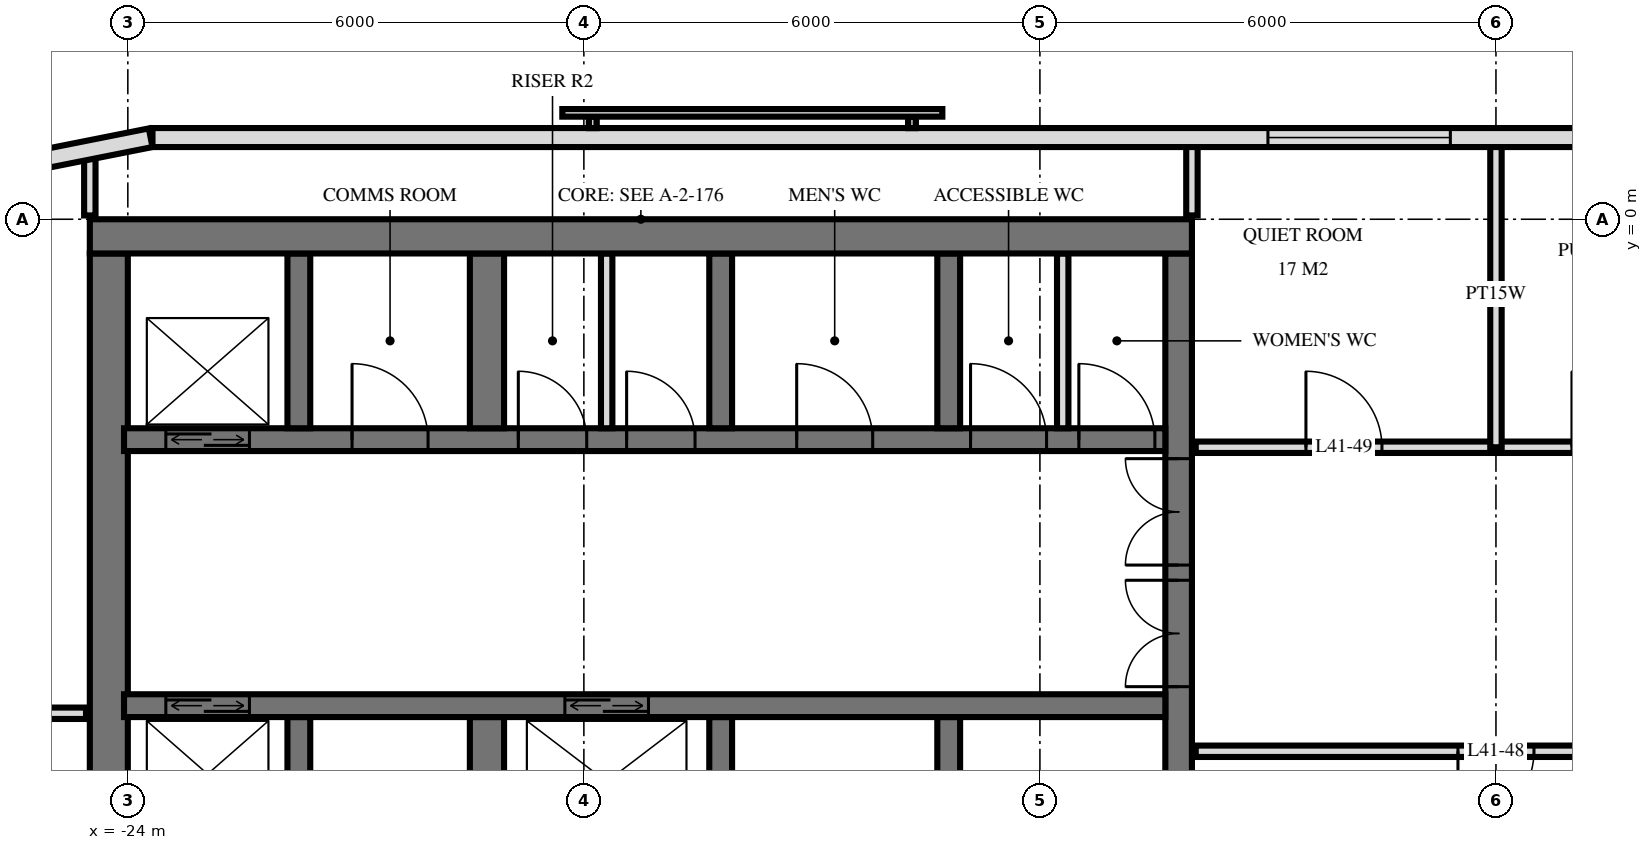
"""IFC4 building model, lengths in metres.
Left out: names, types, materials, properties, quantities, classifications, styles, units other than length and angle.
Written with IfcOpenShell. Run it as: python <this file> out.ifc"""

import sys

from ifc_helpers import new_model, si_unit, direction, frame, frame_2d, origin, place, context, subcontext, project, spatial, rectangle, extrude, element, fill, save


model = new_model("IFC4")
c1 = context("Model", 3, precision=1e-05, world=origin(), true_north=direction((0.0, 1.0)))
c2 = subcontext(c1, "Body", "Model", "MODEL_VIEW")
j1 = project(units=[si_unit("LENGTHUNIT", "METRE"), si_unit("PLANEANGLEUNIT", "RADIAN")], contexts=[c1])
p1 = place(None, origin())
s1 = spatial("IfcSite", under=j1, at=p1, CompositionType="ELEMENT")
p2 = place(p1, origin())
s2 = spatial("IfcBuilding", under=s1, at=p2, CompositionType="ELEMENT")
p3 = place(p2, frame((0.0, 0.0, 159.6)))
s3 = spatial("IfcBuildingStorey", under=s2, at=p3, CompositionType="ELEMENT", Elevation=159.6)
p4 = place(p3, frame((-24.5, -0.225, 0.0), z_axis=(0.0, 0.0, 1.0), x_axis=(1.0, 0.0, 0.0)))
e1 = element("IfcWall", 1, at=p4, inside=s3, PredefinedType="SHEAR", context=c2, shape_type="SweptSolid", body=[
    extrude(rectangle(XDim=14.5, YDim=0.45, at=frame_2d((7.25, 0.0))), origin(), (0.0, 0.0, 1.0), 3.6),
])
p5 = place(p3, frame((-10.175, -14.55, 0.0), z_axis=(0.0, 0.0, 1.0), x_axis=(0.0, 1.0, 0.0)))
e2 = element("IfcWall", 2, at=p5, inside=s3, PredefinedType="SHEAR", context=c2, shape_type="SweptSolid", body=[
    extrude(rectangle(XDim=14.1, YDim=0.35, at=frame_2d((7.05, 0.0))), origin(), (0.0, 0.0, 1.0), 3.6),
])
p6 = place(p5, frame((8.4, 0.0, 0.0)))
e3 = element("IfcOpeningElement", 3, at=p6, cuts=e2, PredefinedType="OPENING", context=c2, shape_type="SweptSolid", body=[
    extrude(rectangle(XDim=1.4, YDim=2.4, at=frame_2d((0.7, 1.2))), frame((0.0, 0.185, 0.0), z_axis=(0.0, -1.0, 0.0), x_axis=(1.0, 0.0, 0.0)), (0.0, 0.0, 1.0), 0.37),
])
p7 = place(p5, frame((10.0, 0.0, 0.0)))
e4 = element("IfcOpeningElement", 4, at=p7, cuts=e2, PredefinedType="OPENING", context=c2, shape_type="SweptSolid", body=[
    extrude(rectangle(XDim=1.4, YDim=2.4, at=frame_2d((0.7, 1.2))), frame((0.0, 0.185, 0.0), z_axis=(0.0, -1.0, 0.0), x_axis=(1.0, 0.0, 0.0)), (0.0, 0.0, 1.0), 0.37),
])
p8 = place(p5, frame((4.0, 0.0, 0.0)))
e5 = element("IfcOpeningElement", 5, at=p8, cuts=e2, PredefinedType="OPENING", context=c2, shape_type="SweptSolid", body=[
    extrude(rectangle(XDim=1.2, YDim=2.1, at=frame_2d((0.6, 1.05))), frame((0.0, 0.185, 0.0), z_axis=(0.0, -1.0, 0.0), x_axis=(1.0, 0.0, 0.0)), (0.0, 0.0, 1.0), 0.37),
])
p9 = place(p3, frame((-24.25, -14.55, 0.0), z_axis=(0.0, 0.0, 1.0), x_axis=(0.0, 1.0, 0.0)))
e6 = element("IfcWall", 6, at=p9, inside=s3, PredefinedType="SHEAR", context=c2, shape_type="SweptSolid", body=[
    extrude(rectangle(XDim=14.1, YDim=0.5, at=frame_2d((7.05, 0.0))), origin(), (0.0, 0.0, 1.0), 3.6),
])
p10 = place(p3, frame((-24.05, -2.9, 0.0), z_axis=(0.0, 0.0, 1.0), x_axis=(1.0, 0.0, 0.0)))
e7 = element("IfcWall", 7, at=p10, inside=s3, PredefinedType="SHEAR", context=c2, shape_type="SweptSolid", body=[
    extrude(rectangle(XDim=13.7, YDim=0.3, at=frame_2d((6.85, 0.0))), origin(), (0.0, 0.0, 1.0), 3.6),
])
p11 = place(p10, frame((0.55, 0.0, 0.0)))
e8 = element("IfcOpeningElement", 8, at=p11, cuts=e7, PredefinedType="OPENING", context=c2, shape_type="SweptSolid", body=[
    extrude(rectangle(XDim=1.1, YDim=2.1, at=frame_2d((0.55, 1.05))), frame((0.0, 0.16, 0.0), z_axis=(0.0, -1.0, 0.0), x_axis=(1.0, 0.0, 0.0)), (0.0, 0.0, 1.0), 0.32),
])
p12 = place(p10, frame((6.613, 0.0, 0.0)))
e9 = element("IfcOpeningElement", 9, at=p12, cuts=e7, PredefinedType="OPENING", context=c2, shape_type="SweptSolid", body=[
    extrude(rectangle(XDim=0.9, YDim=2.1, at=frame_2d((0.45, 1.05))), frame((0.0, 0.16, 0.0), z_axis=(0.0, -1.0, 0.0), x_axis=(1.0, 0.0, 0.0)), (0.0, 0.0, 1.0), 0.32),
])
p13 = place(p10, frame((5.188, 0.0, 0.0)))
e10 = element("IfcOpeningElement", 10, at=p13, cuts=e7, PredefinedType="OPENING", context=c2, shape_type="SweptSolid", body=[
    extrude(rectangle(XDim=0.9, YDim=2.1, at=frame_2d((0.45, 1.05))), frame((0.0, 0.16, 0.0), z_axis=(0.0, -1.0, 0.0), x_axis=(1.0, 0.0, 0.0)), (0.0, 0.0, 1.0), 0.32),
])
p14 = place(p10, frame((12.562, 0.0, 0.0)))
e11 = element("IfcOpeningElement", 11, at=p14, cuts=e7, PredefinedType="OPENING", context=c2, shape_type="SweptSolid", body=[
    extrude(rectangle(XDim=1.0, YDim=2.1, at=frame_2d((0.5, 1.05))), frame((0.0, 0.16, 0.0), z_axis=(0.0, -1.0, 0.0), x_axis=(1.0, 0.0, 0.0)), (0.0, 0.0, 1.0), 0.32),
])
p15 = place(p10, frame((11.137, 0.0, 0.0)))
e12 = element("IfcOpeningElement", 12, at=p15, cuts=e7, PredefinedType="OPENING", context=c2, shape_type="SweptSolid", body=[
    extrude(rectangle(XDim=1.0, YDim=2.1, at=frame_2d((0.5, 1.05))), frame((0.0, 0.16, 0.0), z_axis=(0.0, -1.0, 0.0), x_axis=(1.0, 0.0, 0.0)), (0.0, 0.0, 1.0), 0.32),
])
p16 = place(p10, frame((8.85, 0.0, 0.0)))
e13 = element("IfcOpeningElement", 13, at=p16, cuts=e7, PredefinedType="OPENING", context=c2, shape_type="SweptSolid", body=[
    extrude(rectangle(XDim=1.0, YDim=2.1, at=frame_2d((0.5, 1.05))), frame((0.0, 0.16, 0.0), z_axis=(0.0, -1.0, 0.0), x_axis=(1.0, 0.0, 0.0)), (0.0, 0.0, 1.0), 0.32),
])
p17 = place(p10, frame((3.0, 0.0, 0.0)))
e14 = element("IfcOpeningElement", 14, at=p17, cuts=e7, PredefinedType="OPENING", context=c2, shape_type="SweptSolid", body=[
    extrude(rectangle(XDim=1.0, YDim=2.1, at=frame_2d((0.5, 1.05))), frame((0.0, 0.16, 0.0), z_axis=(0.0, -1.0, 0.0), x_axis=(1.0, 0.0, 0.0)), (0.0, 0.0, 1.0), 0.32),
])
p18 = place(p3, frame((-24.05, -6.4, 0.0), z_axis=(0.0, 0.0, 1.0), x_axis=(1.0, 0.0, 0.0)))
e15 = element("IfcWall", 15, at=p18, inside=s3, PredefinedType="SHEAR", context=c2, shape_type="SweptSolid", body=[
    extrude(rectangle(XDim=13.7, YDim=0.3, at=frame_2d((6.85, 0.0))), origin(), (0.0, 0.0, 1.0), 3.6),
])
p19 = place(p18, frame((0.55, 0.0, 0.0)))
e16 = element("IfcOpeningElement", 16, at=p19, cuts=e15, PredefinedType="OPENING", context=c2, shape_type="SweptSolid", body=[
    extrude(rectangle(XDim=1.1, YDim=2.1, at=frame_2d((0.55, 1.05))), frame((0.0, 0.16, 0.0), z_axis=(0.0, -1.0, 0.0), x_axis=(1.0, 0.0, 0.0)), (0.0, 0.0, 1.0), 0.32),
])
p20 = place(p18, frame((5.8, 0.0, 0.0)))
e17 = element("IfcOpeningElement", 17, at=p20, cuts=e15, PredefinedType="OPENING", context=c2, shape_type="SweptSolid", body=[
    extrude(rectangle(XDim=1.1, YDim=2.1, at=frame_2d((0.55, 1.05))), frame((0.0, 0.16, 0.0), z_axis=(0.0, -1.0, 0.0), x_axis=(1.0, 0.0, 0.0)), (0.0, 0.0, 1.0), 0.32),
])
for number, where, z_axis, x_axis in (
    (18, (-13.2, -2.75, 0.0), (0.0, 0.0, 1.0), (0.0, 1.0, 0.0)),
    (19, (-13.2, -8.85, 0.0), (0.0, 0.0, 1.0), (0.0, 1.0, 0.0)),
    (20, (-16.2, -2.75, 0.0), (0.0, 0.0, 1.0), (0.0, 1.0, 0.0)),
    (21, (-16.2, -8.85, 0.0), (0.0, 0.0, 1.0), (0.0, 1.0, 0.0)),
):
    element("IfcWall", number, at=place(p3, frame(where, z_axis=z_axis, x_axis=x_axis)), inside=s3, PredefinedType="SHEAR", context=c2, shape_type="SweptSolid", body=[
        extrude(rectangle(XDim=2.3, YDim=0.3, at=frame_2d((1.15, 0.0))), origin(), (0.0, 0.0, 1.0), 3.6),
    ])
for number, where, z_axis, x_axis in (
    (22, (-19.275, -2.75, 0.0), (0.0, 0.0, 1.0), (0.0, 1.0, 0.0)),
    (23, (-19.275, -8.85, 0.0), (0.0, 0.0, 1.0), (0.0, 1.0, 0.0)),
):
    element("IfcWall", number, at=place(p3, frame(where, z_axis=z_axis, x_axis=x_axis)), inside=s3, PredefinedType="SHEAR", context=c2, shape_type="SweptSolid", body=[
        extrude(rectangle(XDim=2.3, YDim=0.45, at=frame_2d((1.15, 0.0))), origin(), (0.0, 0.0, 1.0), 3.6),
    ])
for number, where, z_axis, x_axis in (
    (24, (-21.75, -2.75, 0.0), (0.0, 0.0, 1.0), (0.0, 1.0, 0.0)),
    (25, (-21.75, -8.85, 0.0), (0.0, 0.0, 1.0), (0.0, 1.0, 0.0)),
):
    element("IfcWall", number, at=place(p3, frame(where, z_axis=z_axis, x_axis=x_axis)), inside=s3, PredefinedType="SHEAR", context=c2, shape_type="SweptSolid", body=[
        extrude(rectangle(XDim=2.3, YDim=0.3, at=frame_2d((1.15, 0.0))), origin(), (0.0, 0.0, 1.0), 3.6),
    ])
p21 = place(p3, frame((23.675, 1.075, 0.0), z_axis=(0.0, 0.0, 1.0), x_axis=(-1.0, 0.0, 0.0)))
e26 = element("IfcWall", 26, at=p21, inside=s3, PredefinedType="SOLIDWALL", context=c2, shape_type="SweptSolid", body=[
    extrude(rectangle(XDim=47.351, YDim=0.25, at=frame_2d((23.675, 0.0))), origin(), (0.0, 0.0, 1.0), 3.32),
])
p22 = place(p21, frame((15.275, 0.0, 0.3)))
e27 = element("IfcOpeningElement", 27, at=p22, cuts=e26, PredefinedType="OPENING", context=c2, shape_type="SweptSolid", body=[
    extrude(rectangle(XDim=2.4, YDim=2.1, at=frame_2d((1.2, 1.05))), frame((0.0, 0.135, 0.0), z_axis=(0.0, -1.0, 0.0), x_axis=(1.0, 0.0, 0.0)), (0.0, 0.0, 1.0), 0.27),
])
p23 = place(p21, frame((18.275, 0.0, 0.3)))
e28 = element("IfcOpeningElement", 28, at=p23, cuts=e26, PredefinedType="OPENING", context=c2, shape_type="SweptSolid", body=[
    extrude(rectangle(XDim=2.4, YDim=2.1, at=frame_2d((1.2, 1.05))), frame((0.0, 0.135, 0.0), z_axis=(0.0, -1.0, 0.0), x_axis=(1.0, 0.0, 0.0)), (0.0, 0.0, 1.0), 0.27),
])
p24 = place(p21, frame((21.275, 0.0, 0.3)))
e29 = element("IfcOpeningElement", 29, at=p24, cuts=e26, PredefinedType="OPENING", context=c2, shape_type="SweptSolid", body=[
    extrude(rectangle(XDim=2.4, YDim=2.1, at=frame_2d((1.2, 1.05))), frame((0.0, 0.135, 0.0), z_axis=(0.0, -1.0, 0.0), x_axis=(1.0, 0.0, 0.0)), (0.0, 0.0, 1.0), 0.27),
])
p25 = place(p21, frame((30.275, 0.0, 0.3)))
e30 = element("IfcOpeningElement", 30, at=p25, cuts=e26, PredefinedType="OPENING", context=c2, shape_type="SweptSolid", body=[
    extrude(rectangle(XDim=2.4, YDim=2.1, at=frame_2d((1.2, 1.05))), frame((0.0, 0.135, 0.0), z_axis=(0.0, -1.0, 0.0), x_axis=(1.0, 0.0, 0.0)), (0.0, 0.0, 1.0), 0.27),
])
p26 = place(p3, frame((-23.7, 1.073, 0.0), z_axis=(0.0, 0.0, 1.0), x_axis=(-0.980803419081, -0.194999110559, 0.0)))
e31 = element("IfcWall", 31, at=p26, inside=s3, PredefinedType="SOLIDWALL", context=c2, shape_type="SweptSolid", body=[
    extrude(rectangle(XDim=1.681, YDim=0.25, at=frame_2d((0.841, 0.0))), origin(), (0.0, 0.0, 1.0), 3.32),
])
for number, where, z_axis, x_axis in (
    (32, (-17.7, -2.75, 0.0), (0.0, 0.0, 1.0), (0.0, 1.0, 0.0)),
    (33, (-11.7, -2.75, 0.0), (0.0, 0.0, 1.0), (0.0, 1.0, 0.0)),
):
    element("IfcWall", number, at=place(p3, frame(where, z_axis=z_axis, x_axis=x_axis)), inside=s3, PredefinedType="PARTITIONING", context=c2, shape_type="SweptSolid", body=[
        extrude(rectangle(XDim=2.3, YDim=0.15, at=frame_2d((1.15, 0.0))), origin(), (0.0, 0.0, 1.0), 3.3),
    ])
p27 = place(p3, frame((-6.0, -3.0, 0.0), z_axis=(0.0, 0.0, 1.0), x_axis=(0.0, 1.0, 0.0)))
e34 = element("IfcWall", 34, at=p27, inside=s3, PredefinedType="PLUMBINGWALL", context=c2, shape_type="SweptSolid", body=[
    extrude(rectangle(XDim=4.02, YDim=0.15, at=frame_2d((2.01, 0.0))), origin(), (0.0, 0.0, 1.0), 3.32),
])
p28 = place(p3, frame((-10.0, 0.05, 0.0), z_axis=(0.0, 0.0, 1.0), x_axis=(0.0, 1.0, 0.0)))
e35 = element("IfcWall", 35, at=p28, inside=s3, PredefinedType="PARTITIONING", context=c2, shape_type="SweptSolid", body=[
    extrude(rectangle(XDim=0.97, YDim=0.15, at=frame_2d((0.485, 0.0))), origin(), (0.0, 0.0, 1.0), 3.32),
])
p29 = place(p3, frame((-24.5, 0.05, 0.0), z_axis=(0.0, 0.0, 1.0), x_axis=(0.0, 1.0, 0.0)))
e36 = element("IfcWall", 36, at=p29, inside=s3, PredefinedType="PARTITIONING", context=c2, shape_type="SweptSolid", body=[
    extrude(rectangle(XDim=0.807, YDim=0.15, at=frame_2d((0.404, 0.0))), origin(), (0.0, 0.0, 1.0), 3.32),
])
p30 = place(p3, frame((-9.95, -7.0, 0.0), z_axis=(0.0, 0.0, 1.0), x_axis=(1.0, 0.0, 0.0)))
e37 = element("IfcWall", 37, at=p30, inside=s3, PredefinedType="PARTITIONING", context=c2, shape_type="SweptSolid", body=[
    extrude(rectangle(XDim=19.9, YDim=0.15, at=frame_2d((9.95, 0.0))), origin(), (0.0, 0.0, 1.0), 3.32),
])
p31 = place(p30, frame((9.45, 0.0, 0.0)))
e38 = element("IfcOpeningElement", 38, at=p31, cuts=e37, PredefinedType="OPENING", context=c2, shape_type="SweptSolid", body=[
    extrude(rectangle(XDim=1.0, YDim=2.1, at=frame_2d((0.5, 1.05))), frame((0.0, 0.085, 0.0), z_axis=(0.0, -1.0, 0.0), x_axis=(1.0, 0.0, 0.0)), (0.0, 0.0, 1.0), 0.17),
])
p32 = place(p30, frame((3.45, 0.0, 0.0)))
e39 = element("IfcOpeningElement", 39, at=p32, cuts=e37, PredefinedType="OPENING", context=c2, shape_type="SweptSolid", body=[
    extrude(rectangle(XDim=1.0, YDim=2.1, at=frame_2d((0.5, 1.05))), frame((0.0, 0.085, 0.0), z_axis=(0.0, -1.0, 0.0), x_axis=(1.0, 0.0, 0.0)), (0.0, 0.0, 1.0), 0.17),
])
p33 = place(p3, frame((-28.02, -6.5, 0.0), z_axis=(0.0, 0.0, 1.0), x_axis=(1.0, 0.0, 0.0)))
e40 = element("IfcWall", 40, at=p33, inside=s3, PredefinedType="PARTITIONING", context=c2, shape_type="SweptSolid", body=[
    extrude(rectangle(XDim=3.47, YDim=0.15, at=frame_2d((1.735, 0.0))), origin(), (0.0, 0.0, 1.0), 3.32),
])
p34 = place(p33, frame((1.22, 0.0, 0.0)))
e41 = element("IfcOpeningElement", 41, at=p34, cuts=e40, PredefinedType="OPENING", context=c2, shape_type="SweptSolid", body=[
    extrude(rectangle(XDim=0.9, YDim=2.1, at=frame_2d((0.45, 1.05))), frame((0.0, 0.085, 0.0), z_axis=(0.0, -1.0, 0.0), x_axis=(1.0, 0.0, 0.0)), (0.0, 0.0, 1.0), 0.17),
])
p35 = place(p3, frame((-9.95, -3.0, 0.0), z_axis=(0.0, 0.0, 1.0), x_axis=(1.0, 0.0, 0.0)))
e42 = element("IfcWall", 42, at=p35, inside=s3, PredefinedType="PARTITIONING", context=c2, shape_type="SweptSolid", body=[
    extrude(rectangle(XDim=19.9, YDim=0.15, at=frame_2d((9.95, 0.0))), origin(), (0.0, 0.0, 1.0), 3.32),
])
p36 = place(p35, frame((1.45, 0.0, 0.0)))
e43 = element("IfcOpeningElement", 43, at=p36, cuts=e42, PredefinedType="OPENING", context=c2, shape_type="SweptSolid", body=[
    extrude(rectangle(XDim=1.0, YDim=2.1, at=frame_2d((0.5, 1.05))), frame((0.0, 0.085, 0.0), z_axis=(0.0, -1.0, 0.0), x_axis=(1.0, 0.0, 0.0)), (0.0, 0.0, 1.0), 0.17),
])
p37 = place(p35, frame((4.95, 0.0, 0.0)))
e44 = element("IfcOpeningElement", 44, at=p37, cuts=e42, PredefinedType="OPENING", context=c2, shape_type="SweptSolid", body=[
    extrude(rectangle(XDim=1.0, YDim=2.1, at=frame_2d((0.5, 1.05))), frame((0.0, 0.085, 0.0), z_axis=(0.0, -1.0, 0.0), x_axis=(1.0, 0.0, 0.0)), (0.0, 0.0, 1.0), 0.17),
])
p38 = place(p35, frame((7.7, 0.0, 0.0)))
e45 = element("IfcOpeningElement", 45, at=p38, cuts=e42, PredefinedType="OPENING", context=c2, shape_type="SweptSolid", body=[
    extrude(rectangle(XDim=1.0, YDim=2.1, at=frame_2d((0.5, 1.05))), frame((0.0, 0.085, 0.0), z_axis=(0.0, -1.0, 0.0), x_axis=(1.0, 0.0, 0.0)), (0.0, 0.0, 1.0), 0.17),
])
p39 = place(p35, frame((14.2, 0.0, 0.0)))
e46 = element("IfcOpeningElement", 46, at=p39, cuts=e42, PredefinedType="OPENING", context=c2, shape_type="SweptSolid", body=[
    extrude(rectangle(XDim=1.0, YDim=2.1, at=frame_2d((0.5, 1.05))), frame((0.0, 0.085, 0.0), z_axis=(0.0, -1.0, 0.0), x_axis=(1.0, 0.0, 0.0)), (0.0, 0.0, 1.0), 0.17),
])
p40 = place(p25, origin())
e47 = element("IfcWindow", 47, at=p40, inside=s3, PartitioningType="SINGLE_PANEL", PredefinedType="WINDOW", context=c2, shape_type="SweptSolid", body=[
    extrude(rectangle(XDim=2.4, YDim=2.1, at=frame_2d((1.2, 1.05))), frame((0.0, 0.03, 0.0), z_axis=(0.0, -1.0, 0.0), x_axis=(1.0, 0.0, 0.0)), (0.0, 0.0, 1.0), 0.06),
])
fill(e30, e47)
p41 = place(p11, origin())
e48 = element("IfcDoor", 48, at=p41, inside=s3, OperationType="DOUBLE_DOOR_SLIDING", PredefinedType="USERDEFINED", context=c2, shape_type="SweptSolid", body=[
    extrude(rectangle(XDim=1.1, YDim=2.1, at=frame_2d((0.55, 1.05))), frame((0.0, 0.025, 0.0), z_axis=(0.0, -1.0, 0.0), x_axis=(1.0, 0.0, 0.0)), (0.0, 0.0, 1.0), 0.05),
])
fill(e8, e48)
p42 = place(p19, origin())
e49 = element("IfcDoor", 49, at=p42, inside=s3, OperationType="DOUBLE_DOOR_SLIDING", PredefinedType="USERDEFINED", context=c2, shape_type="SweptSolid", body=[
    extrude(rectangle(XDim=1.1, YDim=2.1, at=frame_2d((0.55, 1.05))), frame((0.0, 0.025, 0.0), z_axis=(0.0, -1.0, 0.0), x_axis=(1.0, 0.0, 0.0)), (0.0, 0.0, 1.0), 0.05),
])
fill(e16, e49)
p43 = place(p20, origin())
e50 = element("IfcDoor", 50, at=p43, inside=s3, OperationType="DOUBLE_DOOR_SLIDING", PredefinedType="USERDEFINED", context=c2, shape_type="SweptSolid", body=[
    extrude(rectangle(XDim=1.1, YDim=2.1, at=frame_2d((0.55, 1.05))), frame((0.0, 0.025, 0.0), z_axis=(0.0, -1.0, 0.0), x_axis=(1.0, 0.0, 0.0)), (0.0, 0.0, 1.0), 0.05),
])
fill(e17, e50)
p44 = place(p6, origin())
e51 = element("IfcDoor", 51, at=p44, inside=s3, OperationType="DOUBLE_DOOR_SINGLE_SWING", PredefinedType="DOOR", context=c2, shape_type="SweptSolid", body=[
    extrude(rectangle(XDim=1.4, YDim=2.4, at=frame_2d((0.7, 1.2))), frame((0.0, 0.025, 0.0), z_axis=(0.0, -1.0, 0.0), x_axis=(1.0, 0.0, 0.0)), (0.0, 0.0, 1.0), 0.05),
])
fill(e3, e51)
p45 = place(p7, origin())
e52 = element("IfcDoor", 52, at=p45, inside=s3, OperationType="DOUBLE_DOOR_SINGLE_SWING", PredefinedType="DOOR", context=c2, shape_type="SweptSolid", body=[
    extrude(rectangle(XDim=1.4, YDim=2.4, at=frame_2d((0.7, 1.2))), frame((0.0, 0.025, 0.0), z_axis=(0.0, -1.0, 0.0), x_axis=(1.0, 0.0, 0.0)), (0.0, 0.0, 1.0), 0.05),
])
fill(e4, e52)
p46 = place(p12, origin())
e53 = element("IfcDoor", 53, at=p46, inside=s3, OperationType="SINGLE_SWING_RIGHT", PredefinedType="DOOR", context=c2, shape_type="SweptSolid", body=[
    extrude(rectangle(XDim=0.9, YDim=2.1, at=frame_2d((0.45, 1.05))), frame((0.0, 0.025, 0.0), z_axis=(0.0, -1.0, 0.0), x_axis=(1.0, 0.0, 0.0)), (0.0, 0.0, 1.0), 0.05),
])
fill(e9, e53)
p47 = place(p13, origin())
e54 = element("IfcDoor", 54, at=p47, inside=s3, OperationType="SINGLE_SWING_RIGHT", PredefinedType="DOOR", context=c2, shape_type="SweptSolid", body=[
    extrude(rectangle(XDim=0.9, YDim=2.1, at=frame_2d((0.45, 1.05))), frame((0.0, 0.025, 0.0), z_axis=(0.0, -1.0, 0.0), x_axis=(1.0, 0.0, 0.0)), (0.0, 0.0, 1.0), 0.05),
])
fill(e10, e54)
p48 = place(p14, origin())
e55 = element("IfcDoor", 55, at=p48, inside=s3, OperationType="SINGLE_SWING_RIGHT", PredefinedType="DOOR", context=c2, shape_type="SweptSolid", body=[
    extrude(rectangle(XDim=1.0, YDim=2.1, at=frame_2d((0.5, 1.05))), frame((0.0, 0.025, 0.0), z_axis=(0.0, -1.0, 0.0), x_axis=(1.0, 0.0, 0.0)), (0.0, 0.0, 1.0), 0.05),
])
fill(e11, e55)
p49 = place(p15, origin())
e56 = element("IfcDoor", 56, at=p49, inside=s3, OperationType="SINGLE_SWING_RIGHT", PredefinedType="DOOR", context=c2, shape_type="SweptSolid", body=[
    extrude(rectangle(XDim=1.0, YDim=2.1, at=frame_2d((0.5, 1.05))), frame((0.0, 0.025, 0.0), z_axis=(0.0, -1.0, 0.0), x_axis=(1.0, 0.0, 0.0)), (0.0, 0.0, 1.0), 0.05),
])
fill(e12, e56)
p50 = place(p16, origin())
e57 = element("IfcDoor", 57, at=p50, inside=s3, OperationType="SINGLE_SWING_RIGHT", PredefinedType="DOOR", context=c2, shape_type="SweptSolid", body=[
    extrude(rectangle(XDim=1.0, YDim=2.1, at=frame_2d((0.5, 1.05))), frame((0.0, 0.025, 0.0), z_axis=(0.0, -1.0, 0.0), x_axis=(1.0, 0.0, 0.0)), (0.0, 0.0, 1.0), 0.05),
])
fill(e13, e57)
p51 = place(p17, origin())
e58 = element("IfcDoor", 58, at=p51, inside=s3, OperationType="SINGLE_SWING_RIGHT", PredefinedType="DOOR", context=c2, shape_type="SweptSolid", body=[
    extrude(rectangle(XDim=1.0, YDim=2.1, at=frame_2d((0.5, 1.05))), frame((0.0, 0.025, 0.0), z_axis=(0.0, -1.0, 0.0), x_axis=(1.0, 0.0, 0.0)), (0.0, 0.0, 1.0), 0.05),
])
fill(e14, e58)
p52 = place(p32, frame((0.5, 0.0, 0.0), z_axis=(0.0, 0.0, 1.0), x_axis=(-1.0, 0.0, 0.0)))
e59 = element("IfcDoor", 59, at=p52, inside=s3, OperationType="SINGLE_SWING_LEFT", PredefinedType="DOOR", context=c2, shape_type="SweptSolid", body=[
    extrude(rectangle(XDim=1.0, YDim=2.1, at=frame_2d((0.0, 1.05))), frame((0.0, -0.025, 0.0), z_axis=(0.0, 1.0, 0.0), x_axis=(-1.0, 0.0, 0.0)), (0.0, 0.0, 1.0), 0.05),
])
fill(e39, e59)
p53 = place(p36, origin())
e60 = element("IfcDoor", 60, at=p53, inside=s3, OperationType="SINGLE_SWING_RIGHT", PredefinedType="DOOR", context=c2, shape_type="SweptSolid", body=[
    extrude(rectangle(XDim=1.0, YDim=2.1, at=frame_2d((0.5, 1.05))), frame((0.0, 0.025, 0.0), z_axis=(0.0, -1.0, 0.0), x_axis=(1.0, 0.0, 0.0)), (0.0, 0.0, 1.0), 0.05),
])
fill(e43, e60)
save(model, sys.argv[1])
